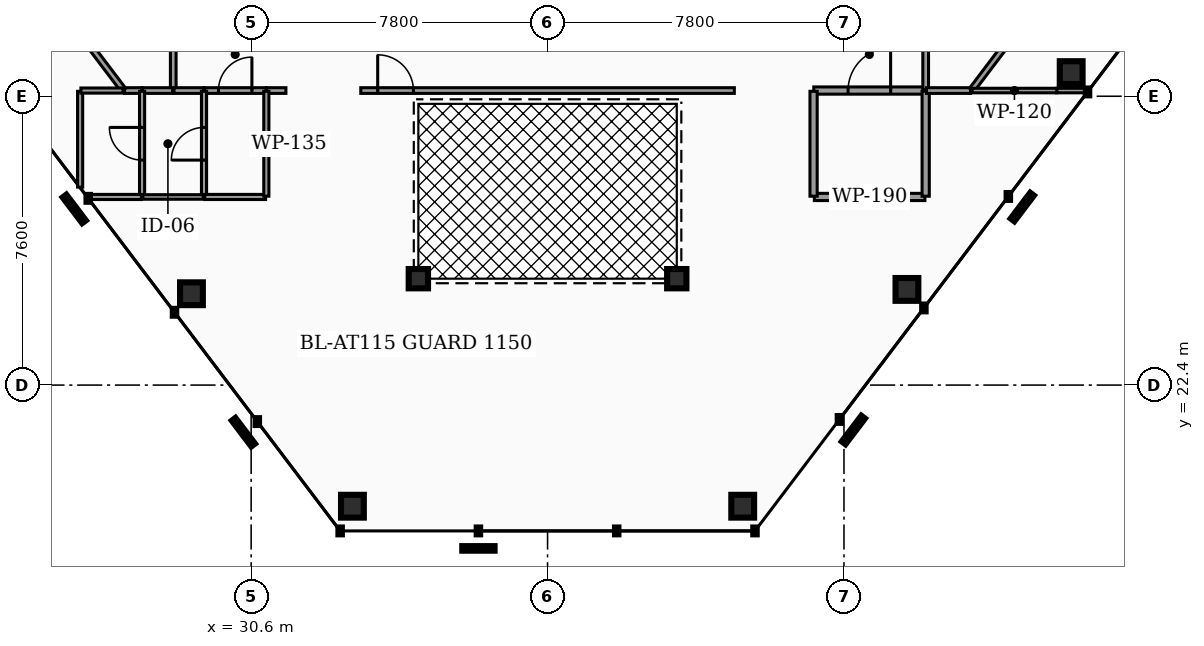
"""IFC4 building model, lengths in metres.
Left out: names, types, materials, properties, quantities, classifications, styles, units other than length and angle.
Written with IfcOpenShell. Run it as: python <this file> out.ifc"""

import sys

from ifc_helpers import new_model, si_unit, direction, frame, frame_2d, origin, origin_2d, place, context, subcontext, project, spatial, rectangle, hollow_rectangle, hollow_circle, extrude, element, fill, save


model = new_model("IFC4")
c1 = context("Model", 3, precision=1e-05, world=origin(), true_north=direction((0.0, 1.0)))
c2 = subcontext(c1, "Body", "Model", "MODEL_VIEW")
j1 = project(units=[si_unit("LENGTHUNIT", "METRE"), si_unit("PLANEANGLEUNIT", "RADIAN")], contexts=[c1])
p1 = place(None, origin())
s1 = spatial("IfcSite", under=j1, at=p1, CompositionType="ELEMENT")
p2 = place(p1, origin())
s2 = spatial("IfcBuilding", under=s1, at=p2, CompositionType="ELEMENT")
p3 = place(p2, frame((0.0, 0.0, 239.36)))
s3 = spatial("IfcBuildingStorey", under=s2, at=p3, CompositionType="ELEMENT", Elevation=239.36)
for number, where, z_axis, x_axis in (
    (1, (29.029, 24.803, 0.0), (0.0, 0.0, 1.0), (1.0, 0.0, 0.0)),
    (2, (33.265, 19.213, 0.0), (0.0, 0.0, 1.0), (1.0, 0.0, 0.0)),
    (3, (43.535, 19.213, 0.0), (0.0, 0.0, 1.0), (1.0, 0.0, 0.0)),
    (4, (47.857, 24.917, 0.0), (0.0, 0.0, 1.0), (1.0, 0.0, 0.0)),
    (5, (52.178, 30.622, 0.0), (0.0, 0.0, 1.0), (1.0, 0.0, 0.0)),
):
    element("IfcColumn", number, at=place(p3, frame(where, z_axis=z_axis, x_axis=x_axis)), inside=s3, PredefinedType="COLUMN", context=c2, shape_type="SweptSolid", body=[
        extrude(hollow_rectangle(XDim=0.6, YDim=0.6, WallThickness=0.03, at=origin_2d()), origin(), (0.0, 0.0, 1.0), 3.18),
    ])
for number, where, z_axis, x_axis in (
    (6, (35.0, 25.2, 0.0), (0.0, 0.0, 1.0), (1.0, 0.0, 0.0)),
    (7, (41.8, 25.2, 0.0), (0.0, 0.0, 1.0), (1.0, 0.0, 0.0)),
):
    element("IfcColumn", number, at=place(p3, frame(where, z_axis=z_axis, x_axis=x_axis)), inside=s3, PredefinedType="COLUMN", context=c2, shape_type="SweptSolid", body=[
        extrude(hollow_circle(Radius=0.254, WallThickness=0.02, at=origin_2d()), origin(), (0.0, 0.0, 1.0), 3.18),
    ])
p4 = place(p3, frame((45.405, 30.15, 0.0), z_axis=(0.0, 0.0, 1.0), x_axis=(1.0, 0.0, 0.0)))
e8 = element("IfcWall", 8, at=p4, inside=s3, PredefinedType="PARTITIONING", context=c2, shape_type="SweptSolid", body=[
    extrude(rectangle(XDim=2.925, YDim=0.19, at=frame_2d((1.462, 0.0))), origin(), (0.0, 0.0, 1.0), 2.235),
])
p5 = place(p4, frame((0.903, 0.0, 0.0)))
e9 = element("IfcOpeningElement", 9, at=p5, cuts=e8, PredefinedType="OPENING", context=c2, shape_type="SweptSolid", body=[
    extrude(rectangle(XDim=1.12, YDim=2.05, at=frame_2d((0.56, 1.025))), frame((0.0, 0.105, 0.0), z_axis=(0.0, -1.0, 0.0), x_axis=(1.0, 0.0, 0.0)), (0.0, 0.0, 1.0), 0.21),
])
p6 = place(p3, frame((28.55, 30.17, 0.0), z_axis=(0.0, 0.0, 1.0), x_axis=(0.0, 1.0, 0.0)))
e10 = element("IfcWall", 10, at=p6, inside=s3, PredefinedType="PARTITIONING", context=c2, shape_type="SweptSolid", body=[
    extrude(rectangle(XDim=3.06, YDim=0.15, at=frame_2d((1.53, 0.0))), origin(), (0.0, 0.0, 1.0), 2.235),
])
p7 = place(p6, frame((1.06, 0.0, 0.0)))
e11 = element("IfcOpeningElement", 11, at=p7, cuts=e10, PredefinedType="OPENING", context=c2, shape_type="SweptSolid", body=[
    extrude(rectangle(XDim=0.94, YDim=2.05, at=frame_2d((0.47, 1.025))), frame((0.0, 0.085, 0.0), z_axis=(0.0, -1.0, 0.0), x_axis=(1.0, 0.0, 0.0)), (0.0, 0.0, 1.0), 0.17),
])
p8 = place(p3, frame((48.35, 30.17, 0.0), z_axis=(0.0, 0.0, 1.0), x_axis=(0.0, 1.0, 0.0)))
e12 = element("IfcWall", 12, at=p8, inside=s3, PredefinedType="PARTITIONING", context=c2, shape_type="SweptSolid", body=[
    extrude(rectangle(XDim=3.06, YDim=0.15, at=frame_2d((1.53, 0.0))), origin(), (0.0, 0.0, 1.0), 2.235),
])
p9 = place(p3, frame((29.365, 30.15, 0.0), z_axis=(0.0, 0.0, 1.0), x_axis=(1.0, 0.0, 0.0)))
e13 = element("IfcWall", 13, at=p9, inside=s3, PredefinedType="PARTITIONING", context=c2, shape_type="SweptSolid", body=[
    extrude(rectangle(XDim=1.63, YDim=0.15, at=frame_2d((0.815, 0.0))), origin(), (0.0, 0.0, 1.0), 2.235),
])
p10 = place(p9, frame((0.375, 0.0, 0.0)))
e14 = element("IfcOpeningElement", 14, at=p10, cuts=e13, PredefinedType="OPENING", context=c2, shape_type="SweptSolid", body=[
    extrude(rectangle(XDim=0.88, YDim=2.05, at=frame_2d((0.44, 1.025))), frame((0.0, 0.085, 0.0), z_axis=(0.0, -1.0, 0.0), x_axis=(1.0, 0.0, 0.0)), (0.0, 0.0, 1.0), 0.17),
])
p11 = place(p3, frame((28.57, 30.15, 0.0), z_axis=(0.0, 0.0, 1.0), x_axis=(1.0, 0.0, 0.0)))
e15 = element("IfcWall", 15, at=p11, inside=s3, PredefinedType="PARTITIONING", context=c2, shape_type="SweptSolid", body=[
    extrude(rectangle(XDim=0.785, YDim=0.15, at=frame_2d((0.393, 0.0))), origin(), (0.0, 0.0, 1.0), 2.235),
])
p12 = place(p3, frame((33.485, 30.15, 0.0), z_axis=(0.0, 0.0, 1.0), x_axis=(1.0, 0.0, 0.0)))
e16 = element("IfcWall", 16, at=p12, inside=s3, PredefinedType="PARTITIONING", context=c2, shape_type="SweptSolid", body=[
    extrude(rectangle(XDim=9.83, YDim=0.15, at=frame_2d((4.915, 0.0))), origin(), (0.0, 0.0, 1.0), 2.235),
])
p13 = place(p12, frame((0.445, 0.0, 0.0)))
e17 = element("IfcOpeningElement", 17, at=p13, cuts=e16, PredefinedType="OPENING", context=c2, shape_type="SweptSolid", body=[
    extrude(rectangle(XDim=0.94, YDim=2.05, at=frame_2d((0.47, 1.025))), frame((0.0, 0.085, 0.0), z_axis=(0.0, -1.0, 0.0), x_axis=(1.0, 0.0, 0.0)), (0.0, 0.0, 1.0), 0.17),
])
p14 = place(p3, frame((31.005, 30.15, 0.0), z_axis=(0.0, 0.0, 1.0), x_axis=(1.0, 0.0, 0.0)))
e18 = element("IfcWall", 18, at=p14, inside=s3, PredefinedType="PARTITIONING", context=c2, shape_type="SweptSolid", body=[
    extrude(rectangle(XDim=0.51, YDim=0.15, at=frame_2d((0.255, 0.0))), origin(), (0.0, 0.0, 1.0), 2.235),
])
p15 = place(p3, frame((45.42, 27.35, 0.0), z_axis=(0.0, 0.0, 1.0), x_axis=(1.0, 0.0, 0.0)))
e19 = element("IfcWall", 19, at=p15, inside=s3, PredefinedType="PARTITIONING", context=c2, shape_type="SweptSolid", body=[
    extrude(rectangle(XDim=2.91, YDim=0.19, at=frame_2d((1.455, 0.0))), origin(), (0.0, 0.0, 1.0), 2.235),
])
for number, where, z_axis, x_axis in (
    (20, (45.4, 27.37, 0.0), (0.0, 0.0, 1.0), (0.0, 1.0, 0.0)),
    (21, (48.35, 27.37, 0.0), (0.0, 0.0, 1.0), (0.0, 1.0, 0.0)),
):
    element("IfcWall", number, at=place(p3, frame(where, z_axis=z_axis, x_axis=x_axis)), inside=s3, PredefinedType="PARTITIONING", context=c2, shape_type="SweptSolid", body=[
        extrude(rectangle(XDim=2.76, YDim=0.19, at=frame_2d((1.38, 0.0))), origin(), (0.0, 0.0, 1.0), 2.235),
    ])
p16 = place(p3, frame((27.27, 30.15, 0.0), z_axis=(0.0, 0.0, 1.0), x_axis=(1.0, 0.0, 0.0)))
e22 = element("IfcWall", 22, at=p16, inside=s3, PredefinedType="PARTITIONING", context=c2, shape_type="SweptSolid", body=[
    extrude(rectangle(XDim=0.455, YDim=0.15, at=frame_2d((0.228, 0.0))), origin(), (0.0, 0.0, 1.0), 2.235),
])
p17 = place(p3, frame((27.735, 30.15, 0.0), z_axis=(0.0, 0.0, 1.0), x_axis=(1.0, 0.0, 0.0)))
e23 = element("IfcWall", 23, at=p17, inside=s3, PredefinedType="PARTITIONING", context=c2, shape_type="SweptSolid", body=[
    extrude(rectangle(XDim=0.795, YDim=0.15, at=frame_2d((0.397, 0.0))), origin(), (0.0, 0.0, 1.0), 2.235),
])
p18 = place(p3, frame((48.37, 30.15, 0.0), z_axis=(0.0, 0.0, 1.0), x_axis=(1.0, 0.0, 0.0)))
e24 = element("IfcWall", 24, at=p18, inside=s3, PredefinedType="PARTITIONING", context=c2, shape_type="SweptSolid", body=[
    extrude(rectangle(XDim=1.16, YDim=0.15, at=frame_2d((0.58, 0.0))), origin(), (0.0, 0.0, 1.0), 2.235),
])
p19 = place(p3, frame((25.747, 32.134, 0.0), z_axis=(0.0, 0.0, 1.0), x_axis=(0.603931928578, -0.797035899847, 0.0)))
e25 = element("IfcWall", 25, at=p19, inside=s3, PredefinedType="PARTITIONING", context=c2, shape_type="SweptSolid", body=[
    extrude(rectangle(XDim=2.469, YDim=0.15, at=frame_2d((1.235, 0.0))), origin(), (0.0, 0.0, 1.0), 2.235),
])
p20 = place(p3, frame((49.562, 30.166, 0.0), z_axis=(0.0, 0.0, 1.0), x_axis=(0.603806281462, 0.797131089889, 0.0)))
e26 = element("IfcWall", 26, at=p20, inside=s3, PredefinedType="PARTITIONING", context=c2, shape_type="SweptSolid", body=[
    extrude(rectangle(XDim=2.469, YDim=0.15, at=frame_2d((1.234, 0.0))), origin(), (0.0, 0.0, 1.0), 2.235),
])
p21 = place(p3, frame((29.36, 27.37, 0.0), z_axis=(0.0, 0.0, 1.0), x_axis=(0.0, 1.0, 0.0)))
e27 = element("IfcWall", 27, at=p21, inside=s3, PredefinedType="PARTITIONING", context=c2, shape_type="SweptSolid", body=[
    extrude(rectangle(XDim=2.76, YDim=0.135, at=frame_2d((1.38, 0.0))), origin(), (0.0, 0.0, 1.0), 2.235),
])
p22 = place(p21, frame((0.95, 0.0, 0.0)))
e28 = element("IfcOpeningElement", 28, at=p22, cuts=e27, PredefinedType="OPENING", context=c2, shape_type="SweptSolid", body=[
    extrude(rectangle(XDim=0.86, YDim=2.05, at=frame_2d((0.43, 1.025))), frame((0.0, 0.077, 0.0), z_axis=(0.0, -1.0, 0.0), x_axis=(1.0, 0.0, 0.0)), (0.0, 0.0, 1.0), 0.155),
])
p23 = place(p3, frame((29.38, 27.35, 0.0), z_axis=(0.0, 0.0, 1.0), x_axis=(1.0, 0.0, 0.0)))
e29 = element("IfcWall", 29, at=p23, inside=s3, PredefinedType="PARTITIONING", context=c2, shape_type="SweptSolid", body=[
    extrude(rectangle(XDim=1.6, YDim=0.135, at=frame_2d((0.8, 0.0))), origin(), (0.0, 0.0, 1.0), 2.235),
])
p24 = place(p3, frame((31.0, 27.37, 0.0), z_axis=(0.0, 0.0, 1.0), x_axis=(0.0, 1.0, 0.0)))
e30 = element("IfcWall", 30, at=p24, inside=s3, PredefinedType="PARTITIONING", context=c2, shape_type="SweptSolid", body=[
    extrude(rectangle(XDim=2.76, YDim=0.135, at=frame_2d((1.38, 0.0))), origin(), (0.0, 0.0, 1.0), 2.235),
])
p25 = place(p3, frame((27.73, 27.37, 0.0), z_axis=(0.0, 0.0, 1.0), x_axis=(0.0, 1.0, 0.0)))
e31 = element("IfcWall", 31, at=p25, inside=s3, PredefinedType="PARTITIONING", context=c2, shape_type="SweptSolid", body=[
    extrude(rectangle(XDim=2.76, YDim=0.135, at=frame_2d((1.38, 0.0))), origin(), (0.0, 0.0, 1.0), 2.235),
])
p26 = place(p25, frame((0.95, 0.0, 0.0)))
e32 = element("IfcOpeningElement", 32, at=p26, cuts=e31, PredefinedType="OPENING", context=c2, shape_type="SweptSolid", body=[
    extrude(rectangle(XDim=0.86, YDim=2.05, at=frame_2d((0.43, 1.025))), frame((0.0, 0.077, 0.0), z_axis=(0.0, -1.0, 0.0), x_axis=(1.0, 0.0, 0.0)), (0.0, 0.0, 1.0), 0.155),
])
p27 = place(p3, frame((26.3, 27.35, 0.0), z_axis=(0.0, 0.0, 1.0), x_axis=(1.0, 0.0, 0.0)))
e33 = element("IfcWall", 33, at=p27, inside=s3, PredefinedType="PARTITIONING", context=c2, shape_type="SweptSolid", body=[
    extrude(rectangle(XDim=1.41, YDim=0.135, at=frame_2d((0.705, 0.0))), origin(), (0.0, 0.0, 1.0), 2.235),
])
p28 = place(p3, frame((26.1, 27.609, 0.0), z_axis=(0.0, 0.0, 1.0), x_axis=(0.0, 1.0, 0.0)))
e34 = element("IfcWall", 34, at=p28, inside=s3, PredefinedType="PARTITIONING", context=c2, shape_type="SweptSolid", body=[
    extrude(rectangle(XDim=2.521, YDim=0.135, at=frame_2d((1.26, 0.0))), origin(), (0.0, 0.0, 1.0), 2.235),
])
p29 = place(p3, frame((26.12, 30.15, 0.0), z_axis=(0.0, 0.0, 1.0), x_axis=(1.0, 0.0, 0.0)))
e35 = element("IfcWall", 35, at=p29, inside=s3, PredefinedType="PARTITIONING", context=c2, shape_type="SweptSolid", body=[
    extrude(rectangle(XDim=1.11, YDim=0.135, at=frame_2d((0.555, 0.0))), origin(), (0.0, 0.0, 1.0), 2.235),
])
p30 = place(p3, frame((27.75, 27.35, 0.0), z_axis=(0.0, 0.0, 1.0), x_axis=(1.0, 0.0, 0.0)))
e36 = element("IfcWall", 36, at=p30, inside=s3, PredefinedType="PARTITIONING", context=c2, shape_type="SweptSolid", body=[
    extrude(rectangle(XDim=1.59, YDim=0.12, at=frame_2d((0.795, 0.0))), origin(), (0.0, 0.0, 1.0), 2.235),
])
p31 = place(p3, frame((49.57, 30.15, 0.0), z_axis=(0.0, 0.0, 1.0), x_axis=(1.0, 0.0, 0.0)))
e37 = element("IfcWall", 37, at=p31, inside=s3, PredefinedType="PARTITIONING", context=c2, shape_type="SweptSolid", body=[
    extrude(rectangle(XDim=2.23, YDim=0.12, at=frame_2d((1.115, 0.0))), origin(), (0.0, 0.0, 1.0), 2.235),
])
p32 = place(p3, frame((51.8, 30.15, 0.0), z_axis=(0.0, 0.0, 1.0), x_axis=(1.0, 0.0, 0.0)))
e38 = element("IfcWall", 38, at=p32, inside=s3, PredefinedType="PARTITIONING", context=c2, shape_type="SweptSolid", body=[
    extrude(rectangle(XDim=0.822, YDim=0.12, at=frame_2d((0.411, 0.0))), origin(), (0.0, 0.0, 1.0), 2.235),
])
p33 = place(p5, origin())
e39 = element("IfcDoor", 39, at=p33, inside=s3, OperationType="SINGLE_SWING_RIGHT", PredefinedType="DOOR", context=c2, shape_type="SweptSolid", body=[
    extrude(rectangle(XDim=1.12, YDim=2.05, at=frame_2d((0.56, 1.025))), frame((0.0, 0.025, 0.0), z_axis=(0.0, -1.0, 0.0), x_axis=(1.0, 0.0, 0.0)), (0.0, 0.0, 1.0), 0.05),
])
fill(e9, e39)
p34 = place(p10, origin())
e40 = element("IfcDoor", 40, at=p34, inside=s3, OperationType="SINGLE_SWING_RIGHT", PredefinedType="DOOR", context=c2, shape_type="SweptSolid", body=[
    extrude(rectangle(XDim=0.88, YDim=2.05, at=frame_2d((0.44, 1.025))), frame((0.0, 0.025, 0.0), z_axis=(0.0, -1.0, 0.0), x_axis=(1.0, 0.0, 0.0)), (0.0, 0.0, 1.0), 0.05),
])
fill(e14, e40)
p35 = place(p13, origin())
e41 = element("IfcDoor", 41, at=p35, inside=s3, OperationType="SINGLE_SWING_LEFT", PredefinedType="DOOR", context=c2, shape_type="SweptSolid", body=[
    extrude(rectangle(XDim=0.94, YDim=2.05, at=frame_2d((0.47, 1.025))), frame((0.0, 0.025, 0.0), z_axis=(0.0, -1.0, 0.0), x_axis=(1.0, 0.0, 0.0)), (0.0, 0.0, 1.0), 0.05),
])
fill(e17, e41)
p36 = place(p22, origin())
e42 = element("IfcDoor", 42, at=p36, inside=s3, OperationType="SINGLE_SWING_LEFT", PredefinedType="DOOR", context=c2, shape_type="SweptSolid", body=[
    extrude(rectangle(XDim=0.86, YDim=2.05, at=frame_2d((0.43, 1.025))), frame((0.0, 0.025, 0.0), z_axis=(0.0, -1.0, 0.0), x_axis=(1.0, 0.0, 0.0)), (0.0, 0.0, 1.0), 0.05),
])
fill(e28, e42)
p37 = place(p26, origin())
e43 = element("IfcDoor", 43, at=p37, inside=s3, OperationType="SINGLE_SWING_RIGHT", PredefinedType="DOOR", context=c2, shape_type="SweptSolid", body=[
    extrude(rectangle(XDim=0.86, YDim=2.05, at=frame_2d((0.43, 1.025))), frame((0.0, 0.025, 0.0), z_axis=(0.0, -1.0, 0.0), x_axis=(1.0, 0.0, 0.0)), (0.0, 0.0, 1.0), 0.05),
])
fill(e32, e43)
save(model, sys.argv[1])
